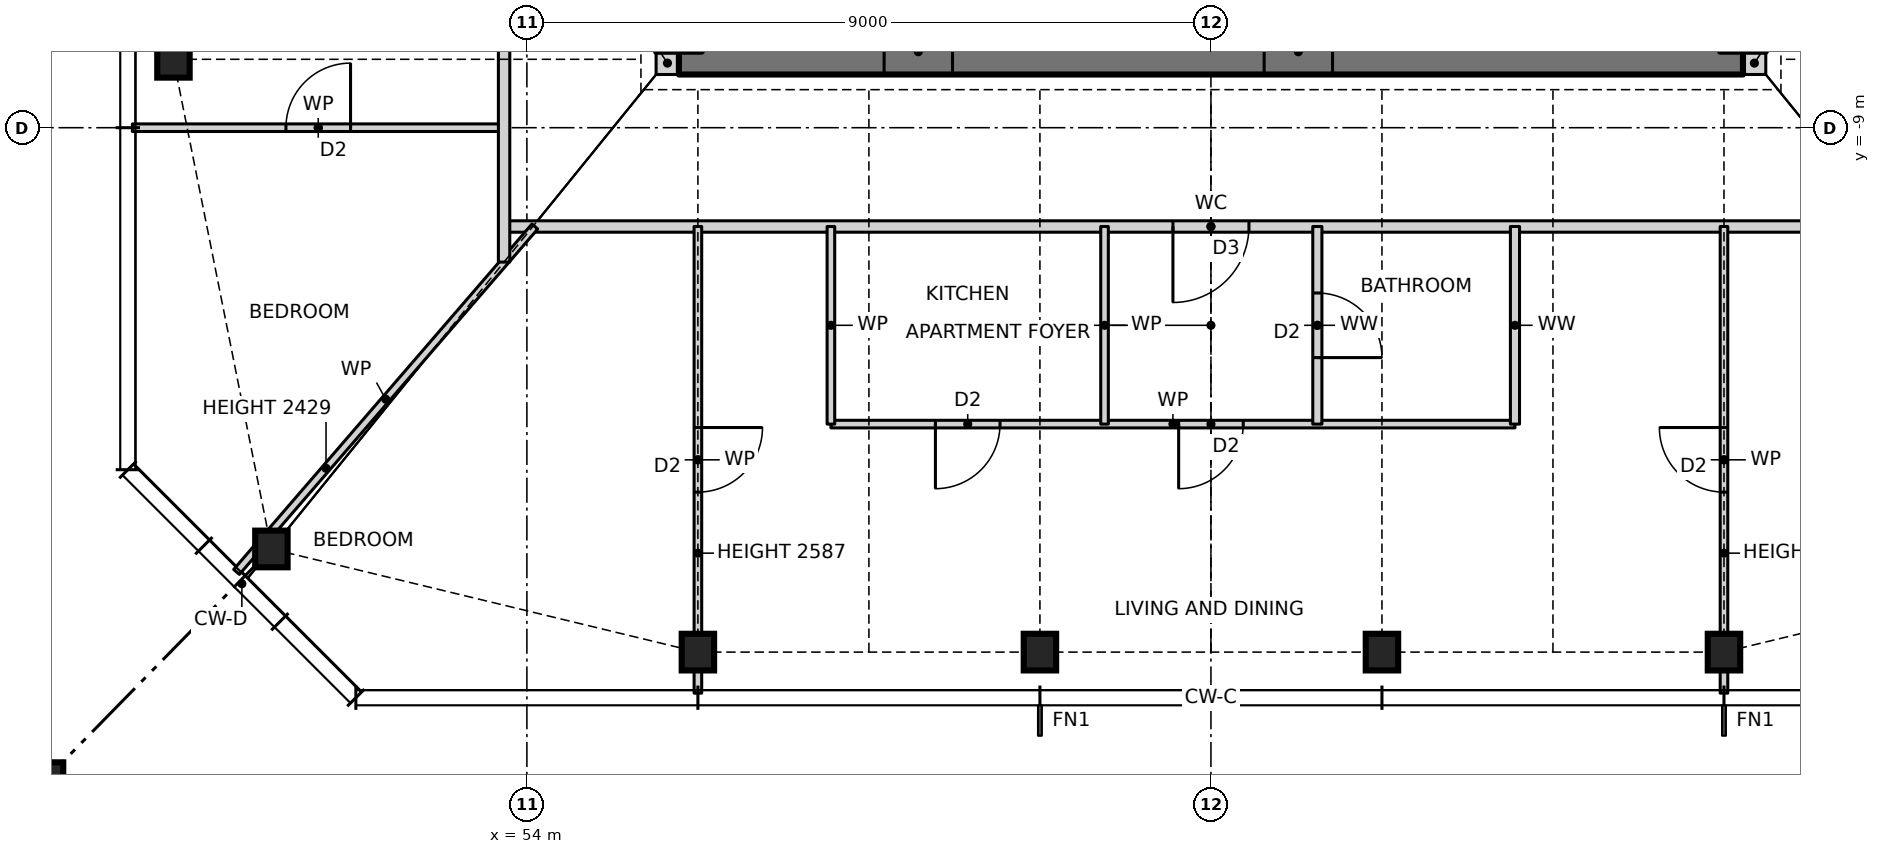
"""IFC4 building model, lengths in metres.
Left out: names, types, materials, properties, quantities, classifications, styles, units other than length and angle.
Written with IfcOpenShell. Run it as: python <this file> out.ifc"""

import sys

from ifc_helpers import new_model, si_unit, direction, frame, frame_2d, origin, origin_2d, place, context, subcontext, project, spatial, rectangle, hollow_rectangle, i_section, extrude, element, fill, save


model = new_model("IFC4")
c1 = context("Model", 3, precision=1e-05, world=origin(), true_north=direction((0.0, 1.0)))
c2 = subcontext(c1, "Body", "Model", "MODEL_VIEW")
j1 = project(units=[si_unit("LENGTHUNIT", "METRE"), si_unit("PLANEANGLEUNIT", "RADIAN")], contexts=[c1])
p1 = place(None, origin())
s1 = spatial("IfcSite", under=j1, at=p1, CompositionType="ELEMENT")
p2 = place(p1, origin())
s2 = spatial("IfcBuilding", under=s1, at=p2, CompositionType="ELEMENT")
p3 = place(p2, frame((0.0, 0.0, 105.0)))
s3 = spatial("IfcBuildingStorey", under=s2, at=p3, CompositionType="ELEMENT", Elevation=105.0)
for number, where, z_axis, x_axis in (
    (1, (50.639, -14.543, 0.0), (0.0, 0.0, 1.0), (1.0, 0.0, 0.0)),
    (2, (56.25, -15.9, 0.0), (0.0, 0.0, 1.0), (1.0, 0.0, 0.0)),
    (3, (60.75, -15.9, 0.0), (0.0, 0.0, 1.0), (1.0, 0.0, 0.0)),
    (4, (65.25, -15.9, 0.0), (0.0, 0.0, 1.0), (1.0, 0.0, 0.0)),
    (5, (69.75, -15.9, 0.0), (0.0, 0.0, 1.0), (1.0, 0.0, 0.0)),
    (6, (49.35, -8.1, 0.0), (0.0, 0.0, 1.0), (1.0, 0.0, 0.0)),
):
    element("IfcColumn", number, at=place(p3, frame(where, z_axis=z_axis, x_axis=x_axis)), inside=s3, PredefinedType="COLUMN", context=c2, shape_type="SweptSolid", body=[
        extrude(i_section(OverallWidth=0.427, OverallDepth=0.483, WebThickness=0.051, FlangeThickness=0.082, at=origin_2d()), origin(), (0.0, 0.0, 1.0), 3.5),
    ])
p4 = place(p3, frame((47.35, -17.9, 0.0), z_axis=(0.0, 0.0, 1.0), x_axis=(1.0, 0.0, 0.0)))
e7 = element("IfcColumn", 7, at=p4, inside=s3, PredefinedType="COLUMN", context=c2, shape_type="SweptSolid", body=[
    extrude(hollow_rectangle(XDim=1.1, YDim=1.1, WallThickness=0.06, at=origin_2d()), origin(), (0.0, 0.0, 1.0), 3.5),
])
for number, where, z_axis, x_axis in (
    (8, (55.7, -8.15, 0.0), (0.0, 0.0, 1.0), (1.0, 0.0, 0.0)),
    (9, (70.0, -8.15, 0.0), (0.0, 0.0, 1.0), (1.0, 0.0, 0.0)),
):
    element("IfcWall", number, at=place(p3, frame(where, z_axis=z_axis, x_axis=x_axis)), inside=s3, PredefinedType="SOLIDWALL", context=c2, shape_type="SweptSolid", body=[
        extrude(rectangle(XDim=0.3, YDim=0.3, at=frame_2d((0.15, 0.0))), origin(), (0.0, 0.0, 1.0), 3.5),
    ])
p5 = place(p3, frame((56.0, -8.0, 0.0), z_axis=(0.0, 0.0, 1.0), x_axis=(1.0, 0.0, 0.0)))
e10 = element("IfcWall", 10, at=p5, inside=s3, PredefinedType="SHEAR", context=c2, shape_type="SweptSolid", body=[
    extrude(rectangle(XDim=14.0, YDim=0.6, at=frame_2d((7.0, 0.0))), origin(), (0.0, 0.0, 1.0), 3.5),
])
p6 = place(p5, frame((2.7, 0.0, 0.0)))
e11 = element("IfcOpeningElement", 11, at=p6, cuts=e10, PredefinedType="OPENING", context=c2, shape_type="SweptSolid", body=[
    extrude(rectangle(XDim=0.9, YDim=2.1, at=frame_2d((0.45, 1.05))), frame((0.0, 0.31, 0.0), z_axis=(0.0, -1.0, 0.0), x_axis=(1.0, 0.0, 0.0)), (0.0, 0.0, 1.0), 0.62),
])
p7 = place(p5, frame((7.7, 0.0, 0.0)))
e12 = element("IfcOpeningElement", 12, at=p7, cuts=e10, PredefinedType="OPENING", context=c2, shape_type="SweptSolid", body=[
    extrude(rectangle(XDim=0.9, YDim=2.1, at=frame_2d((0.45, 1.05))), frame((0.0, 0.31, 0.0), z_axis=(0.0, -1.0, 0.0), x_axis=(1.0, 0.0, 0.0)), (0.0, 0.0, 1.0), 0.62),
])
p8 = place(p3, frame((58.0, -12.9, 0.0), z_axis=(0.0, 0.0, 1.0), x_axis=(1.0, 0.0, 0.0)))
e13 = element("IfcWall", 13, at=p8, inside=s3, PredefinedType="PARTITIONING", context=c2, shape_type="SweptSolid", body=[
    extrude(rectangle(XDim=9.0, YDim=0.1, at=frame_2d((4.5, 0.0))), origin(), (0.0, 0.0, 1.0), 3.27),
])
p9 = place(p8, frame((1.375, 0.0, 0.0)))
e14 = element("IfcOpeningElement", 14, at=p9, cuts=e13, PredefinedType="OPENING", context=c2, shape_type="SweptSolid", body=[
    extrude(rectangle(XDim=0.85, YDim=2.1, at=frame_2d((0.425, 1.05))), frame((0.0, 0.06, 0.0), z_axis=(0.0, -1.0, 0.0), x_axis=(1.0, 0.0, 0.0)), (0.0, 0.0, 1.0), 0.12),
])
p10 = place(p8, frame((4.575, 0.0, 0.0)))
e15 = element("IfcOpeningElement", 15, at=p10, cuts=e13, PredefinedType="OPENING", context=c2, shape_type="SweptSolid", body=[
    extrude(rectangle(XDim=0.85, YDim=2.1, at=frame_2d((0.425, 1.05))), frame((0.0, 0.06, 0.0), z_axis=(0.0, -1.0, 0.0), x_axis=(1.0, 0.0, 0.0)), (0.0, 0.0, 1.0), 0.12),
])
p11 = place(p3, frame((53.7, -10.3, 0.0), z_axis=(0.0, 0.0, 1.0), x_axis=(1.0, 0.0, 0.0)))
e16 = element("IfcWall", 16, at=p11, inside=s3, PredefinedType="PARTITIONING", context=c2, shape_type="SweptSolid", body=[
    extrude(rectangle(XDim=18.6, YDim=0.15, at=frame_2d((9.3, 0.0))), origin(), (0.0, 0.0, 1.0), 3.27),
])
p12 = place(p11, frame((8.8, 0.0, 0.0)))
e17 = element("IfcOpeningElement", 17, at=p12, cuts=e16, PredefinedType="OPENING", context=c2, shape_type="SweptSolid", body=[
    extrude(rectangle(XDim=1.0, YDim=2.1, at=frame_2d((0.5, 1.05))), frame((0.0, 0.085, 0.0), z_axis=(0.0, -1.0, 0.0), x_axis=(1.0, 0.0, 0.0)), (0.0, 0.0, 1.0), 0.17),
])
p13 = place(p3, frame((48.81, -9.0, 0.0), z_axis=(0.0, 0.0, 1.0), x_axis=(1.0, 0.0, 0.0)))
e18 = element("IfcWall", 18, at=p13, inside=s3, PredefinedType="PARTITIONING", context=c2, shape_type="SweptSolid", body=[
    extrude(rectangle(XDim=4.89, YDim=0.1, at=frame_2d((2.445, 0.0))), origin(), (0.0, 0.0, 1.0), 3.27),
])
p14 = place(p13, frame((2.02, 0.0, 0.0)))
e19 = element("IfcOpeningElement", 19, at=p14, cuts=e18, PredefinedType="OPENING", context=c2, shape_type="SweptSolid", body=[
    extrude(rectangle(XDim=0.85, YDim=2.1, at=frame_2d((0.425, 1.05))), frame((0.0, 0.06, 0.0), z_axis=(0.0, -1.0, 0.0), x_axis=(1.0, 0.0, 0.0)), (0.0, 0.0, 1.0), 0.12),
])
p15 = place(p3, frame((50.18, -14.845, 0.0), z_axis=(0.0, 0.0, 1.0), x_axis=(0.653585997703, 0.756852260092, 0.0)))
e20 = element("IfcWall", 20, at=p15, inside=s3, PredefinedType="PARTITIONING", context=c2, shape_type="SweptSolid", body=[
    extrude(rectangle(XDim=6.005, YDim=0.1, at=frame_2d((3.002, 0.0))), origin(), (0.0, 0.0, 1.0), 2.429),
])
p16 = place(p3, frame((69.75, -16.44, 0.0), z_axis=(0.0, 0.0, 1.0), x_axis=(0.0, 1.0, 0.0)))
e21 = element("IfcWall", 21, at=p16, inside=s3, PredefinedType="PARTITIONING", context=c2, shape_type="SweptSolid", body=[
    extrude(rectangle(XDim=6.14, YDim=0.1, at=frame_2d((3.07, 0.0))), origin(), (0.0, 0.0, 1.0), 2.587),
])
p17 = place(p16, frame((2.645, 0.0, 0.0)))
e22 = element("IfcOpeningElement", 22, at=p17, cuts=e21, PredefinedType="OPENING", context=c2, shape_type="SweptSolid", body=[
    extrude(rectangle(XDim=0.85, YDim=2.1, at=frame_2d((0.425, 1.05))), frame((0.0, 0.06, 0.0), z_axis=(0.0, -1.0, 0.0), x_axis=(1.0, 0.0, 0.0)), (0.0, 0.0, 1.0), 0.12),
])
p18 = place(p3, frame((67.0, -12.9, 0.0), z_axis=(0.0, 0.0, 1.0), x_axis=(0.0, 1.0, 0.0)))
e23 = element("IfcWall", 23, at=p18, inside=s3, PredefinedType="PARTITIONING", context=c2, shape_type="SweptSolid", body=[
    extrude(rectangle(XDim=2.6, YDim=0.12, at=frame_2d((1.3, 0.0))), origin(), (0.0, 0.0, 1.0), 3.27),
])
p19 = place(p3, frame((64.4, -12.9, 0.0), z_axis=(0.0, 0.0, 1.0), x_axis=(0.0, 1.0, 0.0)))
e24 = element("IfcWall", 24, at=p19, inside=s3, PredefinedType="PARTITIONING", context=c2, shape_type="SweptSolid", body=[
    extrude(rectangle(XDim=2.6, YDim=0.12, at=frame_2d((1.3, 0.0))), origin(), (0.0, 0.0, 1.0), 3.27),
])
p20 = place(p19, frame((0.875, 0.0, 0.0)))
e25 = element("IfcOpeningElement", 25, at=p20, cuts=e24, PredefinedType="OPENING", context=c2, shape_type="SweptSolid", body=[
    extrude(rectangle(XDim=0.85, YDim=2.1, at=frame_2d((0.425, 1.05))), frame((0.0, 0.07, 0.0), z_axis=(0.0, -1.0, 0.0), x_axis=(1.0, 0.0, 0.0)), (0.0, 0.0, 1.0), 0.14),
])
for number, where, z_axis, x_axis in (
    (26, (61.6, -12.9, 0.0), (0.0, 0.0, 1.0), (0.0, 1.0, 0.0)),
    (27, (58.0, -12.9, 0.0), (0.0, 0.0, 1.0), (0.0, 1.0, 0.0)),
):
    element("IfcWall", number, at=place(p3, frame(where, z_axis=z_axis, x_axis=x_axis)), inside=s3, PredefinedType="PARTITIONING", context=c2, shape_type="SweptSolid", body=[
        extrude(rectangle(XDim=2.6, YDim=0.1, at=frame_2d((1.3, 0.0))), origin(), (0.0, 0.0, 1.0), 3.27),
    ])
p21 = place(p3, frame((56.25, -16.44, 0.0), z_axis=(0.0, 0.0, 1.0), x_axis=(0.0, 1.0, 0.0)))
e28 = element("IfcWall", 28, at=p21, inside=s3, PredefinedType="PARTITIONING", context=c2, shape_type="SweptSolid", body=[
    extrude(rectangle(XDim=6.14, YDim=0.1, at=frame_2d((3.07, 0.0))), origin(), (0.0, 0.0, 1.0), 2.587),
])
p22 = place(p21, frame((2.645, 0.0, 0.0)))
e29 = element("IfcOpeningElement", 29, at=p22, cuts=e28, PredefinedType="OPENING", context=c2, shape_type="SweptSolid", body=[
    extrude(rectangle(XDim=0.85, YDim=2.1, at=frame_2d((0.425, 1.05))), frame((0.0, 0.06, 0.0), z_axis=(0.0, -1.0, 0.0), x_axis=(1.0, 0.0, 0.0)), (0.0, 0.0, 1.0), 0.12),
])
p23 = place(p3, frame((53.7, -10.768, 0.0), z_axis=(0.0, 0.0, 1.0), x_axis=(0.0, 1.0, 0.0)))
e30 = element("IfcWall", 30, at=p23, inside=s3, PredefinedType="PARTITIONING", context=c2, shape_type="SweptSolid", body=[
    extrude(rectangle(XDim=21.668, YDim=0.15, at=frame_2d((10.834, 0.0))), origin(), (0.0, 0.0, 1.0), 3.27),
])
p24 = place(p23, frame((10.268, 0.0, 0.0)))
e31 = element("IfcOpeningElement", 31, at=p24, cuts=e30, PredefinedType="OPENING", context=c2, shape_type="SweptSolid", body=[
    extrude(rectangle(XDim=1.0, YDim=2.1, at=frame_2d((0.5, 1.05))), frame((0.0, 0.085, 0.0), z_axis=(0.0, -1.0, 0.0), x_axis=(1.0, 0.0, 0.0)), (0.0, 0.0, 1.0), 0.17),
])
p25 = place(p9, frame((0.85, 0.0, 0.0), z_axis=(0.0, 0.0, 1.0), x_axis=(-1.0, 0.0, 0.0)))
e32 = element("IfcDoor", 32, at=p25, inside=s3, OperationType="SINGLE_SWING_RIGHT", PredefinedType="DOOR", context=c2, shape_type="SweptSolid", body=[
    extrude(rectangle(XDim=0.85, YDim=2.1, at=frame_2d((0.425, 1.05))), frame((0.0, 0.025, 0.0), z_axis=(0.0, -1.0, 0.0), x_axis=(1.0, 0.0, 0.0)), (0.0, 0.0, 1.0), 0.05),
])
fill(e14, e32)
p26 = place(p12, frame((1.0, 0.0, 0.0), z_axis=(0.0, 0.0, 1.0), x_axis=(-1.0, 0.0, 0.0)))
e33 = element("IfcDoor", 33, at=p26, inside=s3, OperationType="SINGLE_SWING_RIGHT", PredefinedType="DOOR", context=c2, shape_type="SweptSolid", body=[
    extrude(rectangle(XDim=1.0, YDim=2.1, at=frame_2d((0.5, 1.05))), frame((0.0, 0.025, 0.0), z_axis=(0.0, -1.0, 0.0), x_axis=(1.0, 0.0, 0.0)), (0.0, 0.0, 1.0), 0.05),
])
fill(e17, e33)
p27 = place(p10, frame((0.85, 0.0, 0.0), z_axis=(0.0, 0.0, 1.0), x_axis=(-1.0, 0.0, 0.0)))
e34 = element("IfcDoor", 34, at=p27, inside=s3, OperationType="SINGLE_SWING_RIGHT", PredefinedType="DOOR", context=c2, shape_type="SweptSolid", body=[
    extrude(rectangle(XDim=0.85, YDim=2.1, at=frame_2d((0.425, 1.05))), frame((0.0, 0.025, 0.0), z_axis=(0.0, -1.0, 0.0), x_axis=(1.0, 0.0, 0.0)), (0.0, 0.0, 1.0), 0.05),
])
fill(e15, e34)
p28 = place(p20, frame((0.85, 0.0, 0.0), z_axis=(0.0, 0.0, 1.0), x_axis=(-1.0, 0.0, 0.0)))
e35 = element("IfcDoor", 35, at=p28, inside=s3, OperationType="SINGLE_SWING_RIGHT", PredefinedType="DOOR", context=c2, shape_type="SweptSolid", body=[
    extrude(rectangle(XDim=0.85, YDim=2.1, at=frame_2d((0.425, 1.05))), frame((0.0, 0.025, 0.0), z_axis=(0.0, -1.0, 0.0), x_axis=(1.0, 0.0, 0.0)), (0.0, 0.0, 1.0), 0.05),
])
fill(e25, e35)
p29 = place(p22, frame((0.85, 0.0, 0.0), z_axis=(0.0, 0.0, 1.0), x_axis=(-1.0, 0.0, 0.0)))
e36 = element("IfcDoor", 36, at=p29, inside=s3, OperationType="SINGLE_SWING_LEFT", PredefinedType="DOOR", context=c2, shape_type="SweptSolid", body=[
    extrude(rectangle(XDim=0.85, YDim=2.1, at=frame_2d((0.425, 1.05))), frame((0.0, 0.025, 0.0), z_axis=(0.0, -1.0, 0.0), x_axis=(1.0, 0.0, 0.0)), (0.0, 0.0, 1.0), 0.05),
])
fill(e29, e36)
p30 = place(p17, origin())
e37 = element("IfcDoor", 37, at=p30, inside=s3, OperationType="SINGLE_SWING_RIGHT", PredefinedType="DOOR", context=c2, shape_type="SweptSolid", body=[
    extrude(rectangle(XDim=0.85, YDim=2.1, at=frame_2d((0.425, 1.05))), frame((0.0, 0.025, 0.0), z_axis=(0.0, -1.0, 0.0), x_axis=(1.0, 0.0, 0.0)), (0.0, 0.0, 1.0), 0.05),
])
fill(e22, e37)
p31 = place(p14, origin())
e38 = element("IfcDoor", 38, at=p31, inside=s3, OperationType="SINGLE_SWING_RIGHT", PredefinedType="DOOR", context=c2, shape_type="SweptSolid", body=[
    extrude(rectangle(XDim=0.85, YDim=2.1, at=frame_2d((0.425, 1.05))), frame((0.0, 0.025, 0.0), z_axis=(0.0, -1.0, 0.0), x_axis=(1.0, 0.0, 0.0)), (0.0, 0.0, 1.0), 0.05),
])
fill(e19, e38)
p32 = place(p6, origin())
e39 = element("IfcDoor", 39, at=p32, inside=s3, OperationType="SINGLE_SWING_LEFT", PredefinedType="DOOR", context=c2, shape_type="SweptSolid", body=[
    extrude(rectangle(XDim=0.9, YDim=2.1, at=frame_2d((0.45, 1.05))), frame((0.0, 0.025, 0.0), z_axis=(0.0, -1.0, 0.0), x_axis=(1.0, 0.0, 0.0)), (0.0, 0.0, 1.0), 0.05),
])
fill(e11, e39)
p33 = place(p7, origin())
e40 = element("IfcDoor", 40, at=p33, inside=s3, OperationType="SINGLE_SWING_LEFT", PredefinedType="DOOR", context=c2, shape_type="SweptSolid", body=[
    extrude(rectangle(XDim=0.9, YDim=2.1, at=frame_2d((0.45, 1.05))), frame((0.0, 0.025, 0.0), z_axis=(0.0, -1.0, 0.0), x_axis=(1.0, 0.0, 0.0)), (0.0, 0.0, 1.0), 0.05),
])
fill(e12, e40)
save(model, sys.argv[1])
